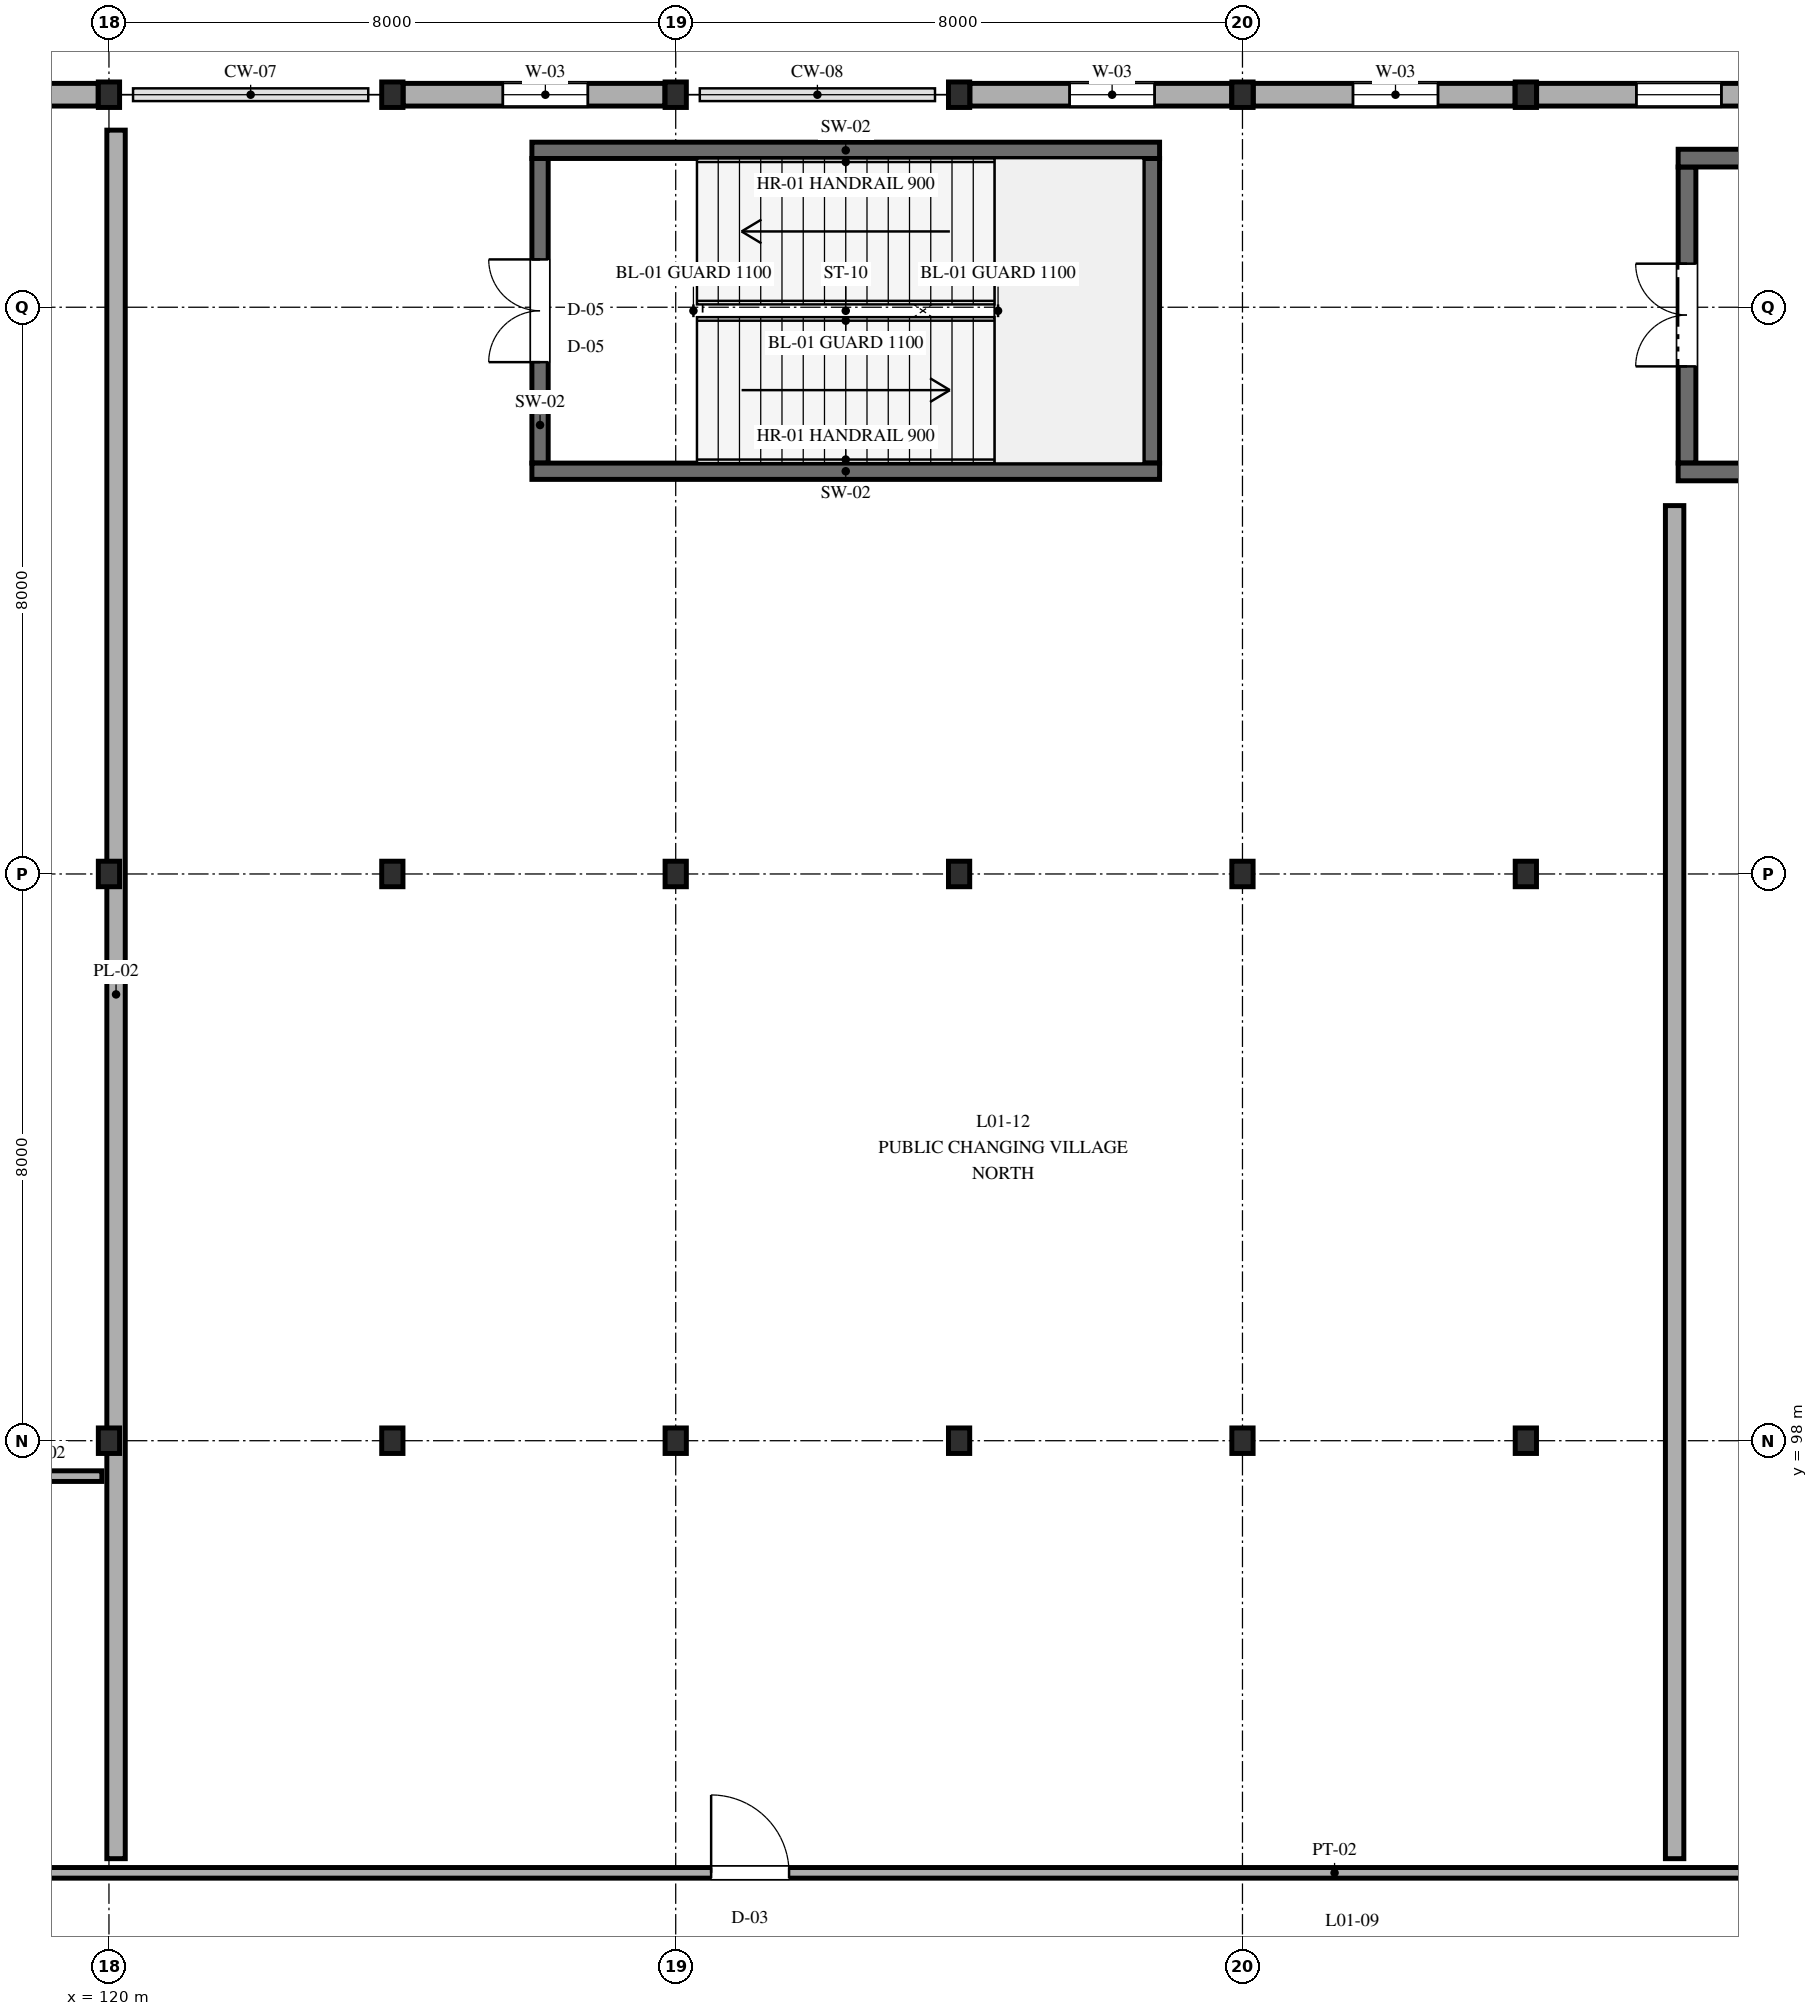
"""IFC4 building model, lengths in metres.
Left out: names, types, materials, properties, quantities, classifications, styles, units other than length and angle.
Written with IfcOpenShell. Run it as: python <this file> out.ifc"""

import sys

from ifc_helpers import new_model, si_unit, direction, frame, frame_2d, origin, origin_2d, place, context, subcontext, project, spatial, rectangle, i_section, extrude, element, fill, save


model = new_model("IFC4")
c1 = context("Model", 3, precision=1e-05, world=origin(), true_north=direction((0.0, 1.0)))
c2 = subcontext(c1, "Body", "Model", "MODEL_VIEW")
j1 = project(units=[si_unit("LENGTHUNIT", "METRE"), si_unit("PLANEANGLEUNIT", "RADIAN")], contexts=[c1])
p1 = place(None, origin())
s1 = spatial("IfcSite", under=j1, at=p1, CompositionType="ELEMENT")
p2 = place(p1, origin())
s2 = spatial("IfcBuilding", under=s1, at=p2, CompositionType="ELEMENT")
p3 = place(p2, frame((0.0, 0.0, 4.8)))
s3 = spatial("IfcBuildingStorey", under=s2, at=p3, CompositionType="ELEMENT", Elevation=4.8)
for number, where, z_axis, x_axis in (
    (1, (120.0, 98.0, 0.0), (0.0, 0.0, 1.0), (1.0, 0.0, 0.0)),
    (2, (120.0, 106.0, 0.0), (0.0, 0.0, 1.0), (1.0, 0.0, 0.0)),
    (3, (120.0, 117.0, 0.0), (0.0, 0.0, 1.0), (1.0, 0.0, 0.0)),
    (4, (124.0, 98.0, 0.0), (0.0, 0.0, 1.0), (1.0, 0.0, 0.0)),
    (5, (124.0, 106.0, 0.0), (0.0, 0.0, 1.0), (1.0, 0.0, 0.0)),
    (6, (124.0, 117.0, 0.0), (0.0, 0.0, 1.0), (1.0, 0.0, 0.0)),
    (7, (128.0, 98.0, 0.0), (0.0, 0.0, 1.0), (1.0, 0.0, 0.0)),
    (8, (128.0, 106.0, 0.0), (0.0, 0.0, 1.0), (1.0, 0.0, 0.0)),
    (9, (128.0, 117.0, 0.0), (0.0, 0.0, 1.0), (1.0, 0.0, 0.0)),
    (10, (132.0, 98.0, 0.0), (0.0, 0.0, 1.0), (1.0, 0.0, 0.0)),
    (11, (132.0, 106.0, 0.0), (0.0, 0.0, 1.0), (1.0, 0.0, 0.0)),
    (12, (132.0, 117.0, 0.0), (0.0, 0.0, 1.0), (1.0, 0.0, 0.0)),
    (13, (136.0, 98.0, 0.0), (0.0, 0.0, 1.0), (1.0, 0.0, 0.0)),
    (14, (136.0, 106.0, 0.0), (0.0, 0.0, 1.0), (1.0, 0.0, 0.0)),
    (15, (136.0, 117.0, 0.0), (0.0, 0.0, 1.0), (1.0, 0.0, 0.0)),
    (16, (140.0, 98.0, 0.0), (0.0, 0.0, 1.0), (1.0, 0.0, 0.0)),
    (17, (140.0, 106.0, 0.0), (0.0, 0.0, 1.0), (1.0, 0.0, 0.0)),
    (18, (140.0, 117.0, 0.0), (0.0, 0.0, 1.0), (1.0, 0.0, 0.0)),
):
    element("IfcColumn", number, at=place(p3, frame(where, z_axis=z_axis, x_axis=x_axis)), inside=s3, PredefinedType="COLUMN", context=c2, shape_type="SweptSolid", body=[
        extrude(i_section(OverallWidth=0.3, OverallDepth=0.36, WebThickness=0.012, FlangeThickness=0.022, FilletRadius=0.027, at=origin_2d()), origin(), (0.0, 0.0, 1.0), 4.8),
    ])
p4 = place(p3, frame((119.848, 117.0, 0.0), z_axis=(0.0, 0.0, 1.0), x_axis=(-1.0, 0.0, 0.0)))
e19 = element("IfcWall", 19, at=p4, inside=s3, PredefinedType="STANDARD", context=c2, shape_type="SweptSolid", body=[
    extrude(rectangle(XDim=7.696, YDim=0.32, at=frame_2d((3.848, 0.0))), origin(), (0.0, 0.0, 1.0), 4.215),
])
p5 = place(p4, frame((2.388, 0.0, 0.95)))
e20 = element("IfcOpeningElement", 20, at=p5, cuts=e19, PredefinedType="OPENING", context=c2, shape_type="SweptSolid", body=[
    extrude(rectangle(XDim=2.1, YDim=1.5, at=frame_2d((1.05, 0.75))), frame((0.0, 0.17, 0.0), z_axis=(0.0, -1.0, 0.0), x_axis=(1.0, 0.0, 0.0)), (0.0, 0.0, 1.0), 0.34),
])
p6 = place(p3, frame((127.848, 117.0, 0.0), z_axis=(0.0, 0.0, 1.0), x_axis=(-1.0, 0.0, 0.0)))
e21 = element("IfcWall", 21, at=p6, inside=s3, PredefinedType="STANDARD", context=c2, shape_type="SweptSolid", body=[
    extrude(rectangle(XDim=3.696, YDim=0.32, at=frame_2d((1.848, 0.0))), origin(), (0.0, 0.0, 1.0), 4.215),
])
p7 = place(p6, frame((1.088, 0.0, 0.95)))
e22 = element("IfcOpeningElement", 22, at=p7, cuts=e21, PredefinedType="OPENING", context=c2, shape_type="SweptSolid", body=[
    extrude(rectangle(XDim=1.2, YDim=1.5, at=frame_2d((0.6, 0.75))), frame((0.0, 0.17, 0.0), z_axis=(0.0, -1.0, 0.0), x_axis=(1.0, 0.0, 0.0)), (0.0, 0.0, 1.0), 0.34),
])
p8 = place(p3, frame((135.848, 117.0, 0.0), z_axis=(0.0, 0.0, 1.0), x_axis=(-1.0, 0.0, 0.0)))
e23 = element("IfcWall", 23, at=p8, inside=s3, PredefinedType="STANDARD", context=c2, shape_type="SweptSolid", body=[
    extrude(rectangle(XDim=3.696, YDim=0.32, at=frame_2d((1.848, 0.0))), origin(), (0.0, 0.0, 1.0), 4.215),
])
p9 = place(p8, frame((1.088, 0.0, 0.95)))
e24 = element("IfcOpeningElement", 24, at=p9, cuts=e23, PredefinedType="OPENING", context=c2, shape_type="SweptSolid", body=[
    extrude(rectangle(XDim=1.2, YDim=1.5, at=frame_2d((0.6, 0.75))), frame((0.0, 0.17, 0.0), z_axis=(0.0, -1.0, 0.0), x_axis=(1.0, 0.0, 0.0)), (0.0, 0.0, 1.0), 0.34),
])
p10 = place(p3, frame((139.848, 117.0, 0.0), z_axis=(0.0, 0.0, 1.0), x_axis=(-1.0, 0.0, 0.0)))
e25 = element("IfcWall", 25, at=p10, inside=s3, PredefinedType="STANDARD", context=c2, shape_type="SweptSolid", body=[
    extrude(rectangle(XDim=3.696, YDim=0.32, at=frame_2d((1.848, 0.0))), origin(), (0.0, 0.0, 1.0), 4.215),
])
p11 = place(p10, frame((1.088, 0.0, 0.95)))
e26 = element("IfcOpeningElement", 26, at=p11, cuts=e25, PredefinedType="OPENING", context=c2, shape_type="SweptSolid", body=[
    extrude(rectangle(XDim=1.2, YDim=1.5, at=frame_2d((0.6, 0.75))), frame((0.0, 0.17, 0.0), z_axis=(0.0, -1.0, 0.0), x_axis=(1.0, 0.0, 0.0)), (0.0, 0.0, 1.0), 0.34),
])
p12 = place(p3, frame((143.848, 117.0, 0.0), z_axis=(0.0, 0.0, 1.0), x_axis=(-1.0, 0.0, 0.0)))
e27 = element("IfcWall", 27, at=p12, inside=s3, PredefinedType="STANDARD", context=c2, shape_type="SweptSolid", body=[
    extrude(rectangle(XDim=3.696, YDim=0.32, at=frame_2d((1.848, 0.0))), origin(), (0.0, 0.0, 1.0), 4.215),
])
p13 = place(p12, frame((1.088, 0.0, 0.95)))
e28 = element("IfcOpeningElement", 28, at=p13, cuts=e27, PredefinedType="OPENING", context=c2, shape_type="SweptSolid", body=[
    extrude(rectangle(XDim=1.2, YDim=1.5, at=frame_2d((0.6, 0.75))), frame((0.0, 0.17, 0.0), z_axis=(0.0, -1.0, 0.0), x_axis=(1.0, 0.0, 0.0)), (0.0, 0.0, 1.0), 0.34),
])
p14 = place(p3, frame((142.275, 111.8, 0.0), z_axis=(0.0, 0.0, 1.0), x_axis=(0.0, 1.0, 0.0)))
e29 = element("IfcWall", 29, at=p14, inside=s3, PredefinedType="SHEAR", context=c2, shape_type="SweptSolid", body=[
    extrude(rectangle(XDim=4.18, YDim=0.25, at=frame_2d((2.09, 0.0))), origin(), (0.0, 0.0, 1.0), 4.8),
])
p15 = place(p14, frame((1.365, 0.0, 0.0)))
e30 = element("IfcOpeningElement", 30, at=p15, cuts=e29, PredefinedType="OPENING", context=c2, shape_type="SweptSolid", body=[
    extrude(rectangle(XDim=1.45, YDim=2.2, at=frame_2d((0.725, 1.1))), frame((0.0, 0.135, 0.0), z_axis=(0.0, -1.0, 0.0), x_axis=(1.0, 0.0, 0.0)), (0.0, 0.0, 1.0), 0.27),
])
for number, where, z_axis, x_axis in (
    (31, (142.15, 111.675, 0.0), (0.0, 0.0, 1.0), (1.0, 0.0, 0.0)),
    (32, (150.85, 116.105, 0.0), (0.0, 0.0, 1.0), (-1.0, 0.0, 0.0)),
):
    element("IfcWall", number, at=place(p3, frame(where, z_axis=z_axis, x_axis=x_axis)), inside=s3, PredefinedType="SHEAR", context=c2, shape_type="SweptSolid", body=[
        extrude(rectangle(XDim=8.7, YDim=0.25, at=frame_2d((4.35, 0.0))), origin(), (0.0, 0.0, 1.0), 4.8),
    ])
p16 = place(p3, frame((126.085, 111.8, 0.0), z_axis=(0.0, 0.0, 1.0), x_axis=(0.0, 1.0, 0.0)))
e33 = element("IfcWall", 33, at=p16, inside=s3, PredefinedType="SHEAR", context=c2, shape_type="SweptSolid", body=[
    extrude(rectangle(XDim=4.3, YDim=0.23, at=frame_2d((2.15, 0.0))), origin(), (0.0, 0.0, 1.0), 4.8),
])
p17 = place(p16, frame((1.425, 0.0, 0.0)))
e34 = element("IfcOpeningElement", 34, at=p17, cuts=e33, PredefinedType="OPENING", context=c2, shape_type="SweptSolid", body=[
    extrude(rectangle(XDim=1.45, YDim=2.2, at=frame_2d((0.725, 1.1))), frame((0.0, 0.125, 0.0), z_axis=(0.0, -1.0, 0.0), x_axis=(1.0, 0.0, 0.0)), (0.0, 0.0, 1.0), 0.25),
])
p18 = place(p3, frame((134.715, 116.1, 0.0), z_axis=(0.0, 0.0, 1.0), x_axis=(0.0, -1.0, 0.0)))
e35 = element("IfcWall", 35, at=p18, inside=s3, PredefinedType="SHEAR", context=c2, shape_type="SweptSolid", body=[
    extrude(rectangle(XDim=4.3, YDim=0.23, at=frame_2d((2.15, 0.0))), origin(), (0.0, 0.0, 1.0), 4.8),
])
for number, where, z_axis, x_axis in (
    (36, (125.97, 111.685, 0.0), (0.0, 0.0, 1.0), (1.0, 0.0, 0.0)),
    (37, (134.83, 116.215, 0.0), (0.0, 0.0, 1.0), (-1.0, 0.0, 0.0)),
):
    element("IfcWall", number, at=place(p3, frame(where, z_axis=z_axis, x_axis=x_axis)), inside=s3, PredefinedType="SHEAR", context=c2, shape_type="SweptSolid", body=[
        extrude(rectangle(XDim=8.86, YDim=0.23, at=frame_2d((4.43, 0.0))), origin(), (0.0, 0.0, 1.0), 4.8),
    ])
p19 = place(p3, frame((104.5, 91.9, 0.0), z_axis=(0.0, 0.0, 1.0), x_axis=(1.0, 0.0, 0.0)))
e38 = element("IfcWall", 38, at=p19, inside=s3, PredefinedType="PARTITIONING", context=c2, shape_type="SweptSolid", body=[
    extrude(rectangle(XDim=55.0, YDim=0.15, at=frame_2d((27.5, 0.0))), origin(), (0.0, 0.0, 1.0), 3.95),
])
p20 = place(p19, frame((2.5, 0.0, 0.0)))
e39 = element("IfcOpeningElement", 39, at=p20, cuts=e38, PredefinedType="OPENING", context=c2, shape_type="SweptSolid", body=[
    extrude(rectangle(XDim=1.1, YDim=2.2, at=frame_2d((0.55, 1.1))), frame((0.0, 0.085, 0.0), z_axis=(0.0, -1.0, 0.0), x_axis=(1.0, 0.0, 0.0)), (0.0, 0.0, 1.0), 0.17),
])
p21 = place(p19, frame((11.2, 0.0, 0.0)))
e40 = element("IfcOpeningElement", 40, at=p21, cuts=e38, PredefinedType="OPENING", context=c2, shape_type="SweptSolid", body=[
    extrude(rectangle(XDim=1.05, YDim=2.15, at=frame_2d((0.525, 1.075))), frame((0.0, 0.085, 0.0), z_axis=(0.0, -1.0, 0.0), x_axis=(1.0, 0.0, 0.0)), (0.0, 0.0, 1.0), 0.17),
])
p22 = place(p19, frame((24.0, 0.0, 0.0)))
e41 = element("IfcOpeningElement", 41, at=p22, cuts=e38, PredefinedType="OPENING", context=c2, shape_type="SweptSolid", body=[
    extrude(rectangle(XDim=1.1, YDim=2.2, at=frame_2d((0.55, 1.1))), frame((0.0, 0.085, 0.0), z_axis=(0.0, -1.0, 0.0), x_axis=(1.0, 0.0, 0.0)), (0.0, 0.0, 1.0), 0.17),
])
p23 = place(p19, frame((40.5, 0.0, 0.0)))
e42 = element("IfcOpeningElement", 42, at=p23, cuts=e38, PredefinedType="OPENING", context=c2, shape_type="SweptSolid", body=[
    extrude(rectangle(XDim=1.0, YDim=2.15, at=frame_2d((0.5, 1.075))), frame((0.0, 0.085, 0.0), z_axis=(0.0, -1.0, 0.0), x_axis=(1.0, 0.0, 0.0)), (0.0, 0.0, 1.0), 0.17),
])
p24 = place(p19, frame((49.0, 0.0, 0.0)))
e43 = element("IfcOpeningElement", 43, at=p24, cuts=e38, PredefinedType="OPENING", context=c2, shape_type="SweptSolid", body=[
    extrude(rectangle(XDim=1.35, YDim=2.2, at=frame_2d((0.675, 1.1))), frame((0.0, 0.085, 0.0), z_axis=(0.0, -1.0, 0.0), x_axis=(1.0, 0.0, 0.0)), (0.0, 0.0, 1.0), 0.17),
])
p25 = place(p3, frame((114.1, 97.5, 0.0), z_axis=(0.0, 0.0, 1.0), x_axis=(1.0, 0.0, 0.0)))
e44 = element("IfcWall", 44, at=p25, inside=s3, PredefinedType="PARTITIONING", context=c2, shape_type="SweptSolid", body=[
    extrude(rectangle(XDim=5.8, YDim=0.15, at=frame_2d((2.9, 0.0))), origin(), (0.0, 0.0, 1.0), 3.95),
])
p26 = place(p25, frame((2.2, 0.0, 0.0)))
e45 = element("IfcOpeningElement", 45, at=p26, cuts=e44, PredefinedType="OPENING", context=c2, shape_type="SweptSolid", body=[
    extrude(rectangle(XDim=1.6, YDim=2.2, at=frame_2d((0.8, 1.1))), frame((0.0, 0.085, 0.0), z_axis=(0.0, -1.0, 0.0), x_axis=(1.0, 0.0, 0.0)), (0.0, 0.0, 1.0), 0.17),
])
p27 = place(p3, frame((120.1, 92.1, 0.0), z_axis=(0.0, 0.0, 1.0), x_axis=(0.0, 1.0, 0.0)))
e46 = element("IfcWall", 46, at=p27, inside=s3, PredefinedType="PLUMBINGWALL", context=c2, shape_type="SweptSolid", body=[
    extrude(rectangle(XDim=24.4, YDim=0.26, at=frame_2d((12.2, 0.0))), origin(), (0.0, 0.0, 1.0), 3.95),
])
p28 = place(p3, frame((142.1, 92.1, 0.0), z_axis=(0.0, 0.0, 1.0), x_axis=(0.0, 1.0, 0.0)))
e47 = element("IfcWall", 47, at=p28, inside=s3, PredefinedType="PLUMBINGWALL", context=c2, shape_type="SweptSolid", body=[
    extrude(rectangle(XDim=19.1, YDim=0.26, at=frame_2d((9.55, 0.0))), origin(), (0.0, 0.0, 1.0), 3.95),
])
p29 = place(p7, origin())
e48 = element("IfcWindow", 48, at=p29, inside=s3, PartitioningType="SINGLE_PANEL", PredefinedType="WINDOW", context=c2, shape_type="SweptSolid", body=[
    extrude(rectangle(XDim=1.2, YDim=1.5, at=frame_2d((0.6, 0.75))), frame((0.0, 0.03, 0.0), z_axis=(0.0, -1.0, 0.0), x_axis=(1.0, 0.0, 0.0)), (0.0, 0.0, 1.0), 0.06),
])
fill(e22, e48)
p30 = place(p9, origin())
e49 = element("IfcWindow", 49, at=p30, inside=s3, PartitioningType="SINGLE_PANEL", PredefinedType="WINDOW", context=c2, shape_type="SweptSolid", body=[
    extrude(rectangle(XDim=1.2, YDim=1.5, at=frame_2d((0.6, 0.75))), frame((0.0, 0.03, 0.0), z_axis=(0.0, -1.0, 0.0), x_axis=(1.0, 0.0, 0.0)), (0.0, 0.0, 1.0), 0.06),
])
fill(e24, e49)
p31 = place(p11, origin())
e50 = element("IfcWindow", 50, at=p31, inside=s3, PartitioningType="SINGLE_PANEL", PredefinedType="WINDOW", context=c2, shape_type="SweptSolid", body=[
    extrude(rectangle(XDim=1.2, YDim=1.5, at=frame_2d((0.6, 0.75))), frame((0.0, 0.03, 0.0), z_axis=(0.0, -1.0, 0.0), x_axis=(1.0, 0.0, 0.0)), (0.0, 0.0, 1.0), 0.06),
])
fill(e26, e50)
p32 = place(p13, origin())
e51 = element("IfcWindow", 51, at=p32, inside=s3, PartitioningType="SINGLE_PANEL", PredefinedType="WINDOW", context=c2, shape_type="SweptSolid", body=[
    extrude(rectangle(XDim=1.2, YDim=1.5, at=frame_2d((0.6, 0.75))), frame((0.0, 0.03, 0.0), z_axis=(0.0, -1.0, 0.0), x_axis=(1.0, 0.0, 0.0)), (0.0, 0.0, 1.0), 0.06),
])
fill(e28, e51)
p33 = place(p15, origin())
e52 = element("IfcDoor", 52, at=p33, inside=s3, OperationType="DOUBLE_DOOR_SINGLE_SWING", PredefinedType="DOOR", context=c2, shape_type="SweptSolid", body=[
    extrude(rectangle(XDim=1.45, YDim=2.2, at=frame_2d((0.725, 1.1))), frame((0.0, 0.025, 0.0), z_axis=(0.0, -1.0, 0.0), x_axis=(1.0, 0.0, 0.0)), (0.0, 0.0, 1.0), 0.05),
])
fill(e30, e52)
p34 = place(p17, origin())
e53 = element("IfcDoor", 53, at=p34, inside=s3, OperationType="DOUBLE_DOOR_SINGLE_SWING", PredefinedType="DOOR", context=c2, shape_type="SweptSolid", body=[
    extrude(rectangle(XDim=1.45, YDim=2.2, at=frame_2d((0.725, 1.1))), frame((0.0, 0.025, 0.0), z_axis=(0.0, -1.0, 0.0), x_axis=(1.0, 0.0, 0.0)), (0.0, 0.0, 1.0), 0.05),
])
fill(e34, e53)
p35 = place(p22, origin())
e54 = element("IfcDoor", 54, at=p35, inside=s3, OperationType="SINGLE_SWING_LEFT", PredefinedType="DOOR", context=c2, shape_type="SweptSolid", body=[
    extrude(rectangle(XDim=1.1, YDim=2.2, at=frame_2d((0.55, 1.1))), frame((0.0, 0.025, 0.0), z_axis=(0.0, -1.0, 0.0), x_axis=(1.0, 0.0, 0.0)), (0.0, 0.0, 1.0), 0.05),
])
fill(e41, e54)
save(model, sys.argv[1])
